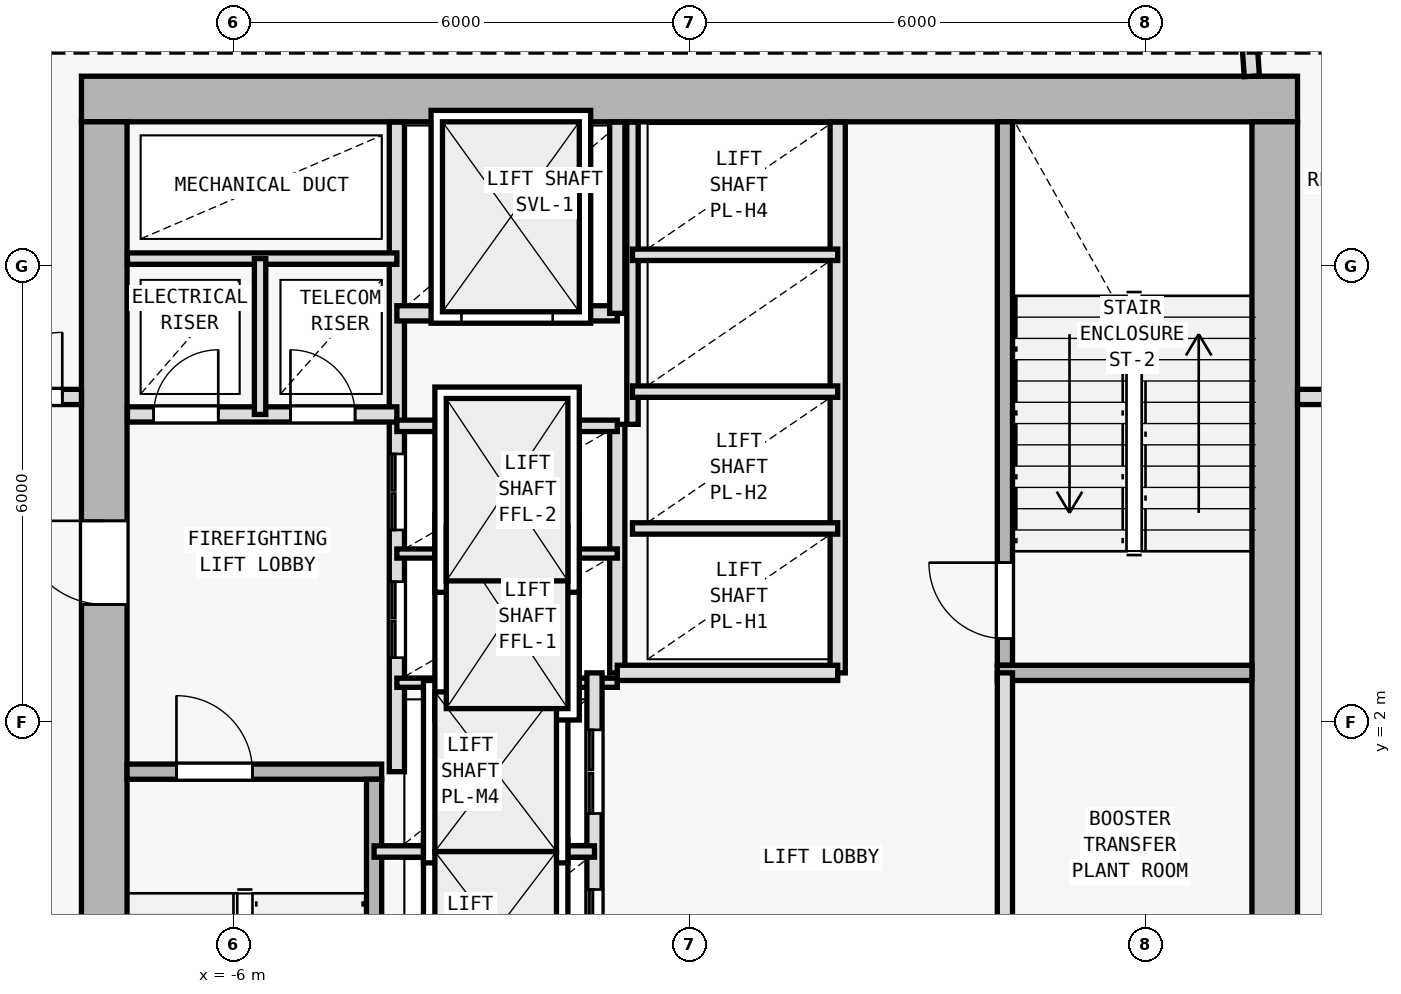
"""IFC4 building model, lengths in metres.
Left out: names, types, materials, properties, quantities, classifications, styles, units other than length and angle.
Written with IfcOpenShell. Run it as: python <this file> out.ifc"""

import sys

from ifc_helpers import new_model, si_unit, direction, frame, frame_2d, origin, origin_2d, place, context, subcontext, project, spatial, rectangle, i_section, extrude, element, fill, save


model = new_model("IFC4")
c1 = context("Model", 3, precision=1e-05, world=origin(), true_north=direction((0.0, 1.0)))
c2 = subcontext(c1, "Body", "Model", "MODEL_VIEW")
j1 = project(units=[si_unit("LENGTHUNIT", "METRE"), si_unit("PLANEANGLEUNIT", "RADIAN")], contexts=[c1])
p1 = place(None, origin())
s1 = spatial("IfcSite", under=j1, at=p1, CompositionType="ELEMENT")
p2 = place(p1, origin())
s2 = spatial("IfcBuilding", under=s1, at=p2, CompositionType="ELEMENT")
p3 = place(p2, frame((0.0, 0.0, 129.3)))
s3 = spatial("IfcBuildingStorey", under=s2, at=p3, CompositionType="ELEMENT", Elevation=129.3)
for number, where, z_axis, x_axis in (
    (1, (7.7, 10.2, 0.0), (0.0, 0.0, 1.0), (1.0, 0.0, 0.0)),
    (2, (-7.7, 10.2, 0.0), (0.0, 0.0, 1.0), (1.0, 0.0, 0.0)),
    (3, (7.7, 0.4, 0.0), (0.0, 0.0, 1.0), (1.0, 0.0, 0.0)),
    (4, (-7.7, 2.0, 0.0), (0.0, 0.0, 1.0), (1.0, 0.0, 0.0)),
):
    element("IfcColumn", number, at=place(p3, frame(where, z_axis=z_axis, x_axis=x_axis)), inside=s3, PredefinedType="COLUMN", context=c2, shape_type="SweptSolid", body=[
        extrude(i_section(OverallWidth=0.409, OverallDepth=0.425, WebThickness=0.021, FlangeThickness=0.034, FilletRadius=0.015, at=origin_2d()), origin(), (0.0, 0.0, 1.0), 4.8),
    ])
p4 = place(p3, frame((8.0, 10.2, 0.0), z_axis=(0.0, 0.0, 1.0), x_axis=(-1.0, 0.0, 0.0)))
e5 = element("IfcWall", 5, at=p4, inside=s3, PredefinedType="SHEAR", context=c2, shape_type="SweptSolid", body=[
    extrude(rectangle(XDim=16.0, YDim=0.6, at=frame_2d((8.0, 0.0))), origin(), (0.0, 0.0, 1.0), 4.5),
])
p5 = place(p3, frame((-7.7, -9.1, 0.0), z_axis=(0.0, 0.0, 1.0), x_axis=(0.0, 1.0, 0.0)))
e6 = element("IfcWall", 6, at=p5, inside=s3, PredefinedType="SHEAR", context=c2, shape_type="SweptSolid", body=[
    extrude(rectangle(XDim=19.0, YDim=0.6, at=frame_2d((9.5, 0.0))), origin(), (0.0, 0.0, 1.0), 4.5),
])
p6 = place(p5, frame((12.65, 0.0, 0.0)))
e7 = element("IfcOpeningElement", 7, at=p6, cuts=e6, PredefinedType="OPENING", context=c2, shape_type="SweptSolid", body=[
    extrude(rectangle(XDim=1.1, YDim=2.15, at=frame_2d((0.55, 1.075))), frame((0.0, 0.31, 0.0), z_axis=(0.0, -1.0, 0.0), x_axis=(1.0, 0.0, 0.0)), (0.0, 0.0, 1.0), 0.62),
])
p7 = place(p3, frame((7.7, 9.9, 0.0), z_axis=(0.0, 0.0, 1.0), x_axis=(0.0, -1.0, 0.0)))
e8 = element("IfcWall", 8, at=p7, inside=s3, PredefinedType="SHEAR", context=c2, shape_type="SweptSolid", body=[
    extrude(rectangle(XDim=19.0, YDim=0.6, at=frame_2d((9.5, 0.0))), origin(), (0.0, 0.0, 1.0), 4.5),
])
p8 = place(p3, frame((-7.4, 1.35, 0.0), z_axis=(0.0, 0.0, 1.0), x_axis=(1.0, 0.0, 0.0)))
e9 = element("IfcWall", 9, at=p8, inside=s3, PredefinedType="SOLIDWALL", context=c2, shape_type="SweptSolid", body=[
    extrude(rectangle(XDim=3.35, YDim=0.2, at=frame_2d((1.675, 0.0))), origin(), (0.0, 0.0, 1.0), 4.5),
])
p9 = place(p8, frame((0.65, 0.0, 0.0)))
e10 = element("IfcOpeningElement", 10, at=p9, cuts=e9, PredefinedType="OPENING", context=c2, shape_type="SweptSolid", body=[
    extrude(rectangle(XDim=1.0, YDim=2.15, at=frame_2d((0.5, 1.075))), frame((0.0, 0.11, 0.0), z_axis=(0.0, -1.0, 0.0), x_axis=(1.0, 0.0, 0.0)), (0.0, 0.0, 1.0), 0.22),
])
p10 = place(p3, frame((-4.15, -5.95, 0.0), z_axis=(0.0, 0.0, 1.0), x_axis=(0.0, 1.0, 0.0)))
e11 = element("IfcWall", 11, at=p10, inside=s3, PredefinedType="SOLIDWALL", context=c2, shape_type="SweptSolid", body=[
    extrude(rectangle(XDim=7.2, YDim=0.2, at=frame_2d((3.6, 0.0))), origin(), (0.0, 0.0, 1.0), 4.5),
])
p11 = place(p3, frame((-3.85, 1.35, 0.0), z_axis=(0.0, 0.0, 1.0), x_axis=(0.0, 1.0, 0.0)))
e12 = element("IfcWall", 12, at=p11, inside=s3, PredefinedType="SOLIDWALL", context=c2, shape_type="SweptSolid", body=[
    extrude(rectangle(XDim=8.545, YDim=0.2, at=frame_2d((4.272, 0.0))), origin(), (0.0, 0.0, 1.0), 4.5),
])
p12 = place(p11, frame((1.5, 0.0, 0.0)))
e13 = element("IfcOpeningElement", 13, at=p12, cuts=e12, PredefinedType="OPENING", context=c2, shape_type="SweptSolid", body=[
    extrude(rectangle(XDim=1.0, YDim=2.15, at=frame_2d((0.5, 1.075))), frame((0.0, 0.11, 0.0), z_axis=(0.0, -1.0, 0.0), x_axis=(1.0, 0.0, 0.0)), (0.0, 0.0, 1.0), 0.22),
])
p13 = place(p11, frame((3.18, 0.0, 0.0)))
e14 = element("IfcOpeningElement", 14, at=p13, cuts=e12, PredefinedType="OPENING", context=c2, shape_type="SweptSolid", body=[
    extrude(rectangle(XDim=1.0, YDim=2.15, at=frame_2d((0.5, 1.075))), frame((0.0, 0.11, 0.0), z_axis=(0.0, -1.0, 0.0), x_axis=(1.0, 0.0, 0.0)), (0.0, 0.0, 1.0), 0.22),
])
p14 = place(p3, frame((-7.395, 6.05, 0.0), z_axis=(0.0, 0.0, 1.0), x_axis=(1.0, 0.0, 0.0)))
e15 = element("IfcWall", 15, at=p14, inside=s3, PredefinedType="SOLIDWALL", context=c2, shape_type="SweptSolid", body=[
    extrude(rectangle(XDim=3.545, YDim=0.2, at=frame_2d((1.772, 0.0))), origin(), (0.0, 0.0, 1.0), 4.5),
])
p15 = place(p14, frame((0.345, 0.0, 0.0)))
e16 = element("IfcOpeningElement", 16, at=p15, cuts=e15, PredefinedType="OPENING", context=c2, shape_type="SweptSolid", body=[
    extrude(rectangle(XDim=0.85, YDim=2.1, at=frame_2d((0.425, 1.05))), frame((0.0, 0.11, 0.0), z_axis=(0.0, -1.0, 0.0), x_axis=(1.0, 0.0, 0.0)), (0.0, 0.0, 1.0), 0.22),
])
p16 = place(p14, frame((2.145, 0.0, 0.0)))
e17 = element("IfcOpeningElement", 17, at=p16, cuts=e15, PredefinedType="OPENING", context=c2, shape_type="SweptSolid", body=[
    extrude(rectangle(XDim=0.85, YDim=2.1, at=frame_2d((0.425, 1.05))), frame((0.0, 0.11, 0.0), z_axis=(0.0, -1.0, 0.0), x_axis=(1.0, 0.0, 0.0)), (0.0, 0.0, 1.0), 0.22),
])
p17 = place(p3, frame((-7.395, 8.1, 0.0), z_axis=(0.0, 0.0, 1.0), x_axis=(1.0, 0.0, 0.0)))
e18 = element("IfcWall", 18, at=p17, inside=s3, PredefinedType="PARTITIONING", context=c2, shape_type="SweptSolid", body=[
    extrude(rectangle(XDim=3.545, YDim=0.15, at=frame_2d((1.772, 0.0))), origin(), (0.0, 0.0, 1.0), 4.5),
])
p18 = place(p3, frame((-5.65, 6.05, 0.0), z_axis=(0.0, 0.0, 1.0), x_axis=(0.0, 1.0, 0.0)))
e19 = element("IfcWall", 19, at=p18, inside=s3, PredefinedType="PARTITIONING", context=c2, shape_type="SweptSolid", body=[
    extrude(rectangle(XDim=2.05, YDim=0.15, at=frame_2d((1.025, 0.0))), origin(), (0.0, 0.0, 1.0), 4.5),
])
p19 = place(p3, frame((4.15, 2.75, 0.0), z_axis=(0.0, 0.0, 1.0), x_axis=(0.0, 1.0, 0.0)))
e20 = element("IfcWall", 20, at=p19, inside=s3, PredefinedType="SOLIDWALL", context=c2, shape_type="SweptSolid", body=[
    extrude(rectangle(XDim=7.15, YDim=0.2, at=frame_2d((3.575, 0.0))), origin(), (0.0, 0.0, 1.0), 4.5),
])
p20 = place(p19, frame((0.35, 0.0, 0.0)))
e21 = element("IfcOpeningElement", 21, at=p20, cuts=e20, PredefinedType="OPENING", context=c2, shape_type="SweptSolid", body=[
    extrude(rectangle(XDim=1.0, YDim=2.15, at=frame_2d((0.5, 1.075))), frame((0.0, 0.11, 0.0), z_axis=(0.0, -1.0, 0.0), x_axis=(1.0, 0.0, 0.0)), (0.0, 0.0, 1.0), 0.22),
])
p21 = place(p3, frame((4.05, 2.65, 0.0), z_axis=(0.0, 0.0, 1.0), x_axis=(1.0, 0.0, 0.0)))
e22 = element("IfcWall", 22, at=p21, inside=s3, PredefinedType="SOLIDWALL", context=c2, shape_type="SweptSolid", body=[
    extrude(rectangle(XDim=3.35, YDim=0.2, at=frame_2d((1.675, 0.0))), origin(), (0.0, 0.0, 1.0), 4.5),
])
p22 = place(p3, frame((-0.95, 2.65, 0.0), z_axis=(0.0, 0.0, 1.0), x_axis=(0.0, 1.0, 0.0)))
e23 = element("IfcWall", 23, at=p22, inside=s3, PredefinedType="SOLIDWALL", context=c2, shape_type="SweptSolid", body=[
    extrude(rectangle(XDim=3.27, YDim=0.2, at=frame_2d((1.635, 0.0))), origin(), (0.0, 0.0, 1.0), 4.5),
])
for number, where, z_axis, x_axis in (
    (24, (-3.85, 2.52, 0.0), (0.0, 0.0, 1.0), (1.0, 0.0, 0.0)),
    (25, (-3.85, 4.22, 0.0), (0.0, 0.0, 1.0), (1.0, 0.0, 0.0)),
):
    element("IfcWall", number, at=place(p3, frame(where, z_axis=z_axis, x_axis=x_axis)), inside=s3, PredefinedType="PARTITIONING", context=c2, shape_type="SweptSolid", body=[
        extrude(rectangle(XDim=2.9, YDim=0.12, at=frame_2d((1.45, 0.0))), origin(), (0.0, 0.0, 1.0), 4.5),
    ])
p23 = place(p3, frame((-3.85, 5.9, 0.0), z_axis=(0.0, 0.0, 1.0), x_axis=(1.0, 0.0, 0.0)))
e26 = element("IfcWall", 26, at=p23, inside=s3, PredefinedType="PARTITIONING", context=c2, shape_type="SweptSolid", body=[
    extrude(rectangle(XDim=2.9, YDim=0.15, at=frame_2d((1.45, 0.0))), origin(), (0.0, 0.0, 1.0), 4.5),
])
p24 = place(p3, frame((-3.85, 7.38, 0.0), z_axis=(0.0, 0.0, 1.0), x_axis=(1.0, 0.0, 0.0)))
e27 = element("IfcWall", 27, at=p24, inside=s3, PredefinedType="SOLIDWALL", context=c2, shape_type="SweptSolid", body=[
    extrude(rectangle(XDim=2.9, YDim=0.2, at=frame_2d((1.45, 0.0))), origin(), (0.0, 0.0, 1.0), 4.5),
])
p25 = place(p24, frame((0.85, 0.0, 0.0)))
e28 = element("IfcOpeningElement", 28, at=p25, cuts=e27, PredefinedType="OPENING", context=c2, shape_type="SweptSolid", body=[
    extrude(rectangle(XDim=1.2, YDim=2.2, at=frame_2d((0.6, 1.1))), frame((0.0, 0.11, 0.0), z_axis=(0.0, -1.0, 0.0), x_axis=(1.0, 0.0, 0.0)), (0.0, 0.0, 1.0), 0.22),
])
p26 = place(p3, frame((-0.95, 7.38, 0.0), z_axis=(0.0, 0.0, 1.0), x_axis=(0.0, 1.0, 0.0)))
e29 = element("IfcWall", 29, at=p26, inside=s3, PredefinedType="SOLIDWALL", context=c2, shape_type="SweptSolid", body=[
    extrude(rectangle(XDim=2.515, YDim=0.2, at=frame_2d((1.258, 0.0))), origin(), (0.0, 0.0, 1.0), 4.5),
])
p27 = place(p3, frame((4.15, -6.05, 0.0), z_axis=(0.0, 0.0, 1.0), x_axis=(0.0, 1.0, 0.0)))
e30 = element("IfcWall", 30, at=p27, inside=s3, PredefinedType="SOLIDWALL", context=c2, shape_type="SweptSolid", body=[
    extrude(rectangle(XDim=8.7, YDim=0.2, at=frame_2d((4.35, 0.0))), origin(), (0.0, 0.0, 1.0), 4.5),
])
p28 = place(p27, frame((3.6, 0.0, 0.0)))
e31 = element("IfcOpeningElement", 31, at=p28, cuts=e30, PredefinedType="OPENING", context=c2, shape_type="SweptSolid", body=[
    extrude(rectangle(XDim=0.95, YDim=2.1, at=frame_2d((0.475, 1.05))), frame((0.0, 0.11, 0.0), z_axis=(0.0, -1.0, 0.0), x_axis=(1.0, 0.0, 0.0)), (0.0, 0.0, 1.0), 0.22),
])
p29 = place(p3, frame((-1.25, -6.05, 0.0), z_axis=(0.0, 0.0, 1.0), x_axis=(0.0, 1.0, 0.0)))
e32 = element("IfcWall", 32, at=p29, inside=s3, PredefinedType="SOLIDWALL", context=c2, shape_type="SweptSolid", body=[
    extrude(rectangle(XDim=8.7, YDim=0.2, at=frame_2d((4.35, 0.0))), origin(), (0.0, 0.0, 1.0), 4.5),
])
p30 = place(p29, frame((0.55, 0.0, 0.0)))
e33 = element("IfcOpeningElement", 33, at=p30, cuts=e32, PredefinedType="OPENING", context=c2, shape_type="SweptSolid", body=[
    extrude(rectangle(XDim=1.1, YDim=2.15, at=frame_2d((0.55, 1.075))), frame((0.0, 0.11, 0.0), z_axis=(0.0, -1.0, 0.0), x_axis=(1.0, 0.0, 0.0)), (0.0, 0.0, 1.0), 0.22),
])
p31 = place(p29, frame((2.65, 0.0, 0.0)))
e34 = element("IfcOpeningElement", 34, at=p31, cuts=e32, PredefinedType="OPENING", context=c2, shape_type="SweptSolid", body=[
    extrude(rectangle(XDim=1.1, YDim=2.15, at=frame_2d((0.55, 1.075))), frame((0.0, 0.11, 0.0), z_axis=(0.0, -1.0, 0.0), x_axis=(1.0, 0.0, 0.0)), (0.0, 0.0, 1.0), 0.22),
])
p32 = place(p29, frame((4.75, 0.0, 0.0)))
e35 = element("IfcOpeningElement", 35, at=p32, cuts=e32, PredefinedType="OPENING", context=c2, shape_type="SweptSolid", body=[
    extrude(rectangle(XDim=1.1, YDim=2.15, at=frame_2d((0.55, 1.075))), frame((0.0, 0.11, 0.0), z_axis=(0.0, -1.0, 0.0), x_axis=(1.0, 0.0, 0.0)), (0.0, 0.0, 1.0), 0.22),
])
p33 = place(p29, frame((6.85, 0.0, 0.0)))
e36 = element("IfcOpeningElement", 36, at=p33, cuts=e32, PredefinedType="OPENING", context=c2, shape_type="SweptSolid", body=[
    extrude(rectangle(XDim=1.1, YDim=2.15, at=frame_2d((0.55, 1.075))), frame((0.0, 0.11, 0.0), z_axis=(0.0, -1.0, 0.0), x_axis=(1.0, 0.0, 0.0)), (0.0, 0.0, 1.0), 0.22),
])
p34 = place(p3, frame((-4.15, 0.3, 0.0), z_axis=(0.0, 0.0, 1.0), x_axis=(1.0, 0.0, 0.0)))
e37 = element("IfcWall", 37, at=p34, inside=s3, PredefinedType="PARTITIONING", context=c2, shape_type="SweptSolid", body=[
    extrude(rectangle(XDim=2.9, YDim=0.15, at=frame_2d((1.45, 0.0))), origin(), (0.0, 0.0, 1.0), 4.5),
])
p35 = place(p3, frame((1.95, 2.65, 0.0), z_axis=(0.0, 0.0, 1.0), x_axis=(0.0, 1.0, 0.0)))
e38 = element("IfcWall", 38, at=p35, inside=s3, PredefinedType="SOLIDWALL", context=c2, shape_type="SweptSolid", body=[
    extrude(rectangle(XDim=7.245, YDim=0.2, at=frame_2d((3.623, 0.0))), origin(), (0.0, 0.0, 1.0), 4.5),
])
p36 = place(p3, frame((-0.95, 2.65, 0.0), z_axis=(0.0, 0.0, 1.0), x_axis=(1.0, 0.0, 0.0)))
e39 = element("IfcWall", 39, at=p36, inside=s3, PredefinedType="SOLIDWALL", context=c2, shape_type="SweptSolid", body=[
    extrude(rectangle(XDim=2.9, YDim=0.2, at=frame_2d((1.45, 0.0))), origin(), (0.0, 0.0, 1.0), 4.5),
])
p37 = place(p3, frame((-0.75, 5.92, 0.0), z_axis=(0.0, 0.0, 1.0), x_axis=(0.0, 1.0, 0.0)))
e40 = element("IfcWall", 40, at=p37, inside=s3, PredefinedType="PARTITIONING", context=c2, shape_type="SweptSolid", body=[
    extrude(rectangle(XDim=3.975, YDim=0.15, at=frame_2d((1.988, 0.0))), origin(), (0.0, 0.0, 1.0), 4.5),
])
for number, where, z_axis, x_axis in (
    (41, (-0.75, 4.55, 0.0), (0.0, 0.0, 1.0), (1.0, 0.0, 0.0)),
    (42, (-0.75, 6.35, 0.0), (0.0, 0.0, 1.0), (1.0, 0.0, 0.0)),
    (43, (-0.75, 8.15, 0.0), (0.0, 0.0, 1.0), (1.0, 0.0, 0.0)),
):
    element("IfcWall", number, at=place(p3, frame(where, z_axis=z_axis, x_axis=x_axis)), inside=s3, PredefinedType="PARTITIONING", context=c2, shape_type="SweptSolid", body=[
        extrude(rectangle(XDim=2.7, YDim=0.15, at=frame_2d((1.35, 0.0))), origin(), (0.0, 0.0, 1.0), 4.5),
    ])
p38 = place(p3, frame((-14.31, 3.042, 0.0), z_axis=(0.0, 0.0, 1.0), x_axis=(0.562466830755, 0.826819849968, 0.0)))
e44 = element("IfcWall", 44, at=p38, inside=s3, PredefinedType="PARTITIONING", context=c2, shape_type="SweptSolid", body=[
    extrude(rectangle(XDim=12.988, YDim=0.15, at=frame_2d((6.494, 0.0))), origin(), (0.0, 0.0, 1.0), 4.035),
])
p39 = place(p3, frame((-9.83, 6.28, 0.0), z_axis=(0.0, 0.0, 1.0), x_axis=(1.0, 0.0, 0.0)))
e45 = element("IfcWall", 45, at=p39, inside=s3, PredefinedType="SOLIDWALL", context=c2, shape_type="SweptSolid", body=[
    extrude(rectangle(XDim=1.83, YDim=0.2, at=frame_2d((0.915, 0.0))), origin(), (0.0, 0.0, 1.0), 4.175),
])
p40 = place(p39, frame((0.728, 0.0, 0.0)))
e46 = element("IfcOpeningElement", 46, at=p40, cuts=e45, PredefinedType="OPENING", context=c2, shape_type="SweptSolid", body=[
    extrude(rectangle(XDim=0.85, YDim=2.1, at=frame_2d((0.425, 1.05))), frame((0.0, 0.11, 0.0), z_axis=(0.0, -1.0, 0.0), x_axis=(1.0, 0.0, 0.0)), (0.0, 0.0, 1.0), 0.22),
])
p41 = place(p3, frame((8.0, 6.28, 0.0), z_axis=(0.0, 0.0, 1.0), x_axis=(1.0, 0.0, 0.0)))
e47 = element("IfcWall", 47, at=p41, inside=s3, PredefinedType="SOLIDWALL", context=c2, shape_type="SweptSolid", body=[
    extrude(rectangle(XDim=1.83, YDim=0.2, at=frame_2d((0.915, 0.0))), origin(), (0.0, 0.0, 1.0), 4.5),
])
p42 = place(p41, frame((0.365, 0.0, 0.0)))
e48 = element("IfcOpeningElement", 48, at=p42, cuts=e47, PredefinedType="OPENING", context=c2, shape_type="SweptSolid", body=[
    extrude(rectangle(XDim=0.85, YDim=2.1, at=frame_2d((0.425, 1.05))), frame((0.0, 0.11, 0.0), z_axis=(0.0, -1.0, 0.0), x_axis=(1.0, 0.0, 0.0)), (0.0, 0.0, 1.0), 0.22),
])
p43 = place(p3, frame((7.399, 10.5, 0.0), z_axis=(0.0, 0.0, 1.0), x_axis=(-0.06892407576, 0.99762190823, 0.0)))
e49 = element("IfcWall", 49, at=p43, inside=s3, PredefinedType="SOLIDWALL", context=c2, shape_type="SweptSolid", body=[
    extrude(rectangle(XDim=3.16, YDim=0.2, at=frame_2d((1.58, 0.0))), origin(), (0.0, 0.0, 1.0), 4.5),
])
p44 = place(p6, origin())
e50 = element("IfcDoor", 50, at=p44, inside=s3, OperationType="SINGLE_SWING_RIGHT", PredefinedType="DOOR", context=c2, shape_type="SweptSolid", body=[
    extrude(rectangle(XDim=1.1, YDim=2.15, at=frame_2d((0.55, 1.075))), frame((0.0, 0.025, 0.0), z_axis=(0.0, -1.0, 0.0), x_axis=(1.0, 0.0, 0.0)), (0.0, 0.0, 1.0), 0.05),
])
fill(e7, e50)
p45 = place(p9, origin())
e51 = element("IfcDoor", 51, at=p45, inside=s3, OperationType="SINGLE_SWING_LEFT", PredefinedType="DOOR", context=c2, shape_type="SweptSolid", body=[
    extrude(rectangle(XDim=1.0, YDim=2.15, at=frame_2d((0.5, 1.075))), frame((0.0, 0.025, 0.0), z_axis=(0.0, -1.0, 0.0), x_axis=(1.0, 0.0, 0.0)), (0.0, 0.0, 1.0), 0.05),
])
fill(e10, e51)
p46 = place(p15, origin())
e52 = element("IfcDoor", 52, at=p46, inside=s3, OperationType="SINGLE_SWING_RIGHT", PredefinedType="DOOR", context=c2, shape_type="SweptSolid", body=[
    extrude(rectangle(XDim=0.85, YDim=2.1, at=frame_2d((0.425, 1.05))), frame((0.0, 0.025, 0.0), z_axis=(0.0, -1.0, 0.0), x_axis=(1.0, 0.0, 0.0)), (0.0, 0.0, 1.0), 0.05),
])
fill(e16, e52)
p47 = place(p16, origin())
e53 = element("IfcDoor", 53, at=p47, inside=s3, OperationType="SINGLE_SWING_LEFT", PredefinedType="DOOR", context=c2, shape_type="SweptSolid", body=[
    extrude(rectangle(XDim=0.85, YDim=2.1, at=frame_2d((0.425, 1.05))), frame((0.0, 0.025, 0.0), z_axis=(0.0, -1.0, 0.0), x_axis=(1.0, 0.0, 0.0)), (0.0, 0.0, 1.0), 0.05),
])
fill(e17, e53)
p48 = place(p20, origin())
e54 = element("IfcDoor", 54, at=p48, inside=s3, OperationType="SINGLE_SWING_RIGHT", PredefinedType="DOOR", context=c2, shape_type="SweptSolid", body=[
    extrude(rectangle(XDim=1.0, YDim=2.15, at=frame_2d((0.5, 1.075))), frame((0.0, 0.025, 0.0), z_axis=(0.0, -1.0, 0.0), x_axis=(1.0, 0.0, 0.0)), (0.0, 0.0, 1.0), 0.05),
])
fill(e21, e54)
p49 = place(p25, origin())
e55 = element("IfcDoor", 55, at=p49, inside=s3, OperationType="DOUBLE_DOOR_SLIDING", PredefinedType="DOOR", context=c2, shape_type="SweptSolid", body=[
    extrude(rectangle(XDim=1.2, YDim=2.2, at=frame_2d((0.6, 1.1))), frame((0.0, 0.025, 0.0), z_axis=(0.0, -1.0, 0.0), x_axis=(1.0, 0.0, 0.0)), (0.0, 0.0, 1.0), 0.05),
])
fill(e28, e55)
p50 = place(p32, origin())
e56 = element("IfcDoor", 56, at=p50, inside=s3, OperationType="DOUBLE_DOOR_SLIDING", PredefinedType="DOOR", context=c2, shape_type="SweptSolid", body=[
    extrude(rectangle(XDim=1.1, YDim=2.15, at=frame_2d((0.55, 1.075))), frame((0.0, 0.025, 0.0), z_axis=(0.0, -1.0, 0.0), x_axis=(1.0, 0.0, 0.0)), (0.0, 0.0, 1.0), 0.05),
])
fill(e35, e56)
p51 = place(p33, origin())
e57 = element("IfcDoor", 57, at=p51, inside=s3, OperationType="DOUBLE_DOOR_SLIDING", PredefinedType="DOOR", context=c2, shape_type="SweptSolid", body=[
    extrude(rectangle(XDim=1.1, YDim=2.15, at=frame_2d((0.55, 1.075))), frame((0.0, 0.025, 0.0), z_axis=(0.0, -1.0, 0.0), x_axis=(1.0, 0.0, 0.0)), (0.0, 0.0, 1.0), 0.05),
])
fill(e36, e57)
p52 = place(p12, origin())
e58 = element("IfcDoor", 58, at=p52, inside=s3, OperationType="DOUBLE_DOOR_SLIDING", PredefinedType="DOOR", context=c2, shape_type="SweptSolid", body=[
    extrude(rectangle(XDim=1.0, YDim=2.15, at=frame_2d((0.5, 1.075))), frame((0.0, 0.025, 0.0), z_axis=(0.0, -1.0, 0.0), x_axis=(1.0, 0.0, 0.0)), (0.0, 0.0, 1.0), 0.05),
])
fill(e13, e58)
p53 = place(p13, origin())
e59 = element("IfcDoor", 59, at=p53, inside=s3, OperationType="DOUBLE_DOOR_SLIDING", PredefinedType="DOOR", context=c2, shape_type="SweptSolid", body=[
    extrude(rectangle(XDim=1.0, YDim=2.15, at=frame_2d((0.5, 1.075))), frame((0.0, 0.025, 0.0), z_axis=(0.0, -1.0, 0.0), x_axis=(1.0, 0.0, 0.0)), (0.0, 0.0, 1.0), 0.05),
])
fill(e14, e59)
p54 = place(p40, origin())
e60 = element("IfcDoor", 60, at=p54, inside=s3, OperationType="SINGLE_SWING_RIGHT", PredefinedType="DOOR", context=c2, shape_type="SweptSolid", body=[
    extrude(rectangle(XDim=0.85, YDim=2.1, at=frame_2d((0.425, 1.05))), frame((0.0, 0.025, 0.0), z_axis=(0.0, -1.0, 0.0), x_axis=(1.0, 0.0, 0.0)), (0.0, 0.0, 1.0), 0.05),
])
fill(e46, e60)
save(model, sys.argv[1])
